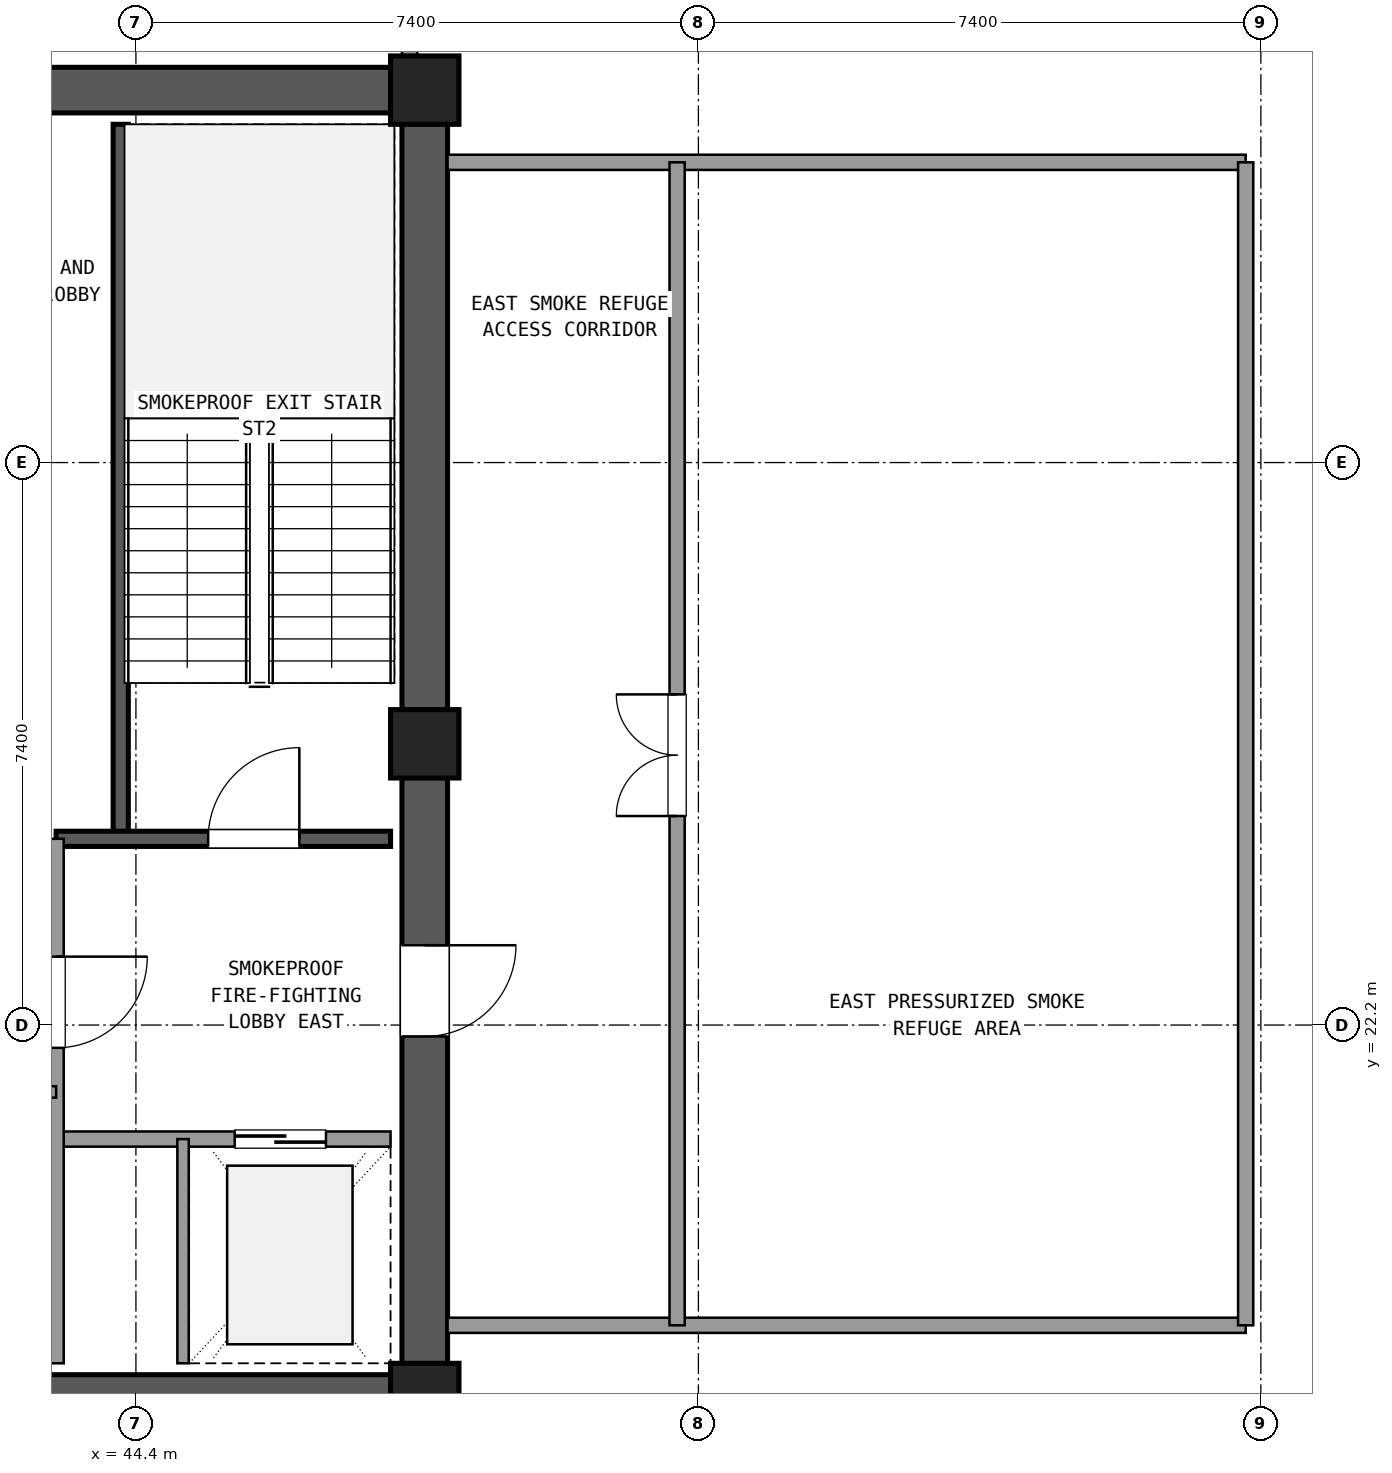
"""IFC4 building model, lengths in metres.
Left out: names, types, materials, properties, quantities, classifications, styles, units other than length and angle.
Written with IfcOpenShell. Run it as: python <this file> out.ifc"""

import sys

from ifc_helpers import new_model, si_unit, direction, frame, frame_2d, origin, origin_2d, place, context, subcontext, project, spatial, rectangle, extrude, element, fill, save


model = new_model("IFC4")
c1 = context("Model", 3, precision=1e-05, world=origin(), true_north=direction((0.0, 1.0)))
c2 = subcontext(c1, "Body", "Model", "MODEL_VIEW")
j1 = project(units=[si_unit("LENGTHUNIT", "METRE"), si_unit("PLANEANGLEUNIT", "RADIAN")], contexts=[c1])
p1 = place(None, origin())
s1 = spatial("IfcSite", under=j1, at=p1, CompositionType="ELEMENT")
p2 = place(p1, origin())
s2 = spatial("IfcBuilding", under=s1, at=p2, CompositionType="ELEMENT")
p3 = place(p2, frame((0.0, 0.0, 232.38)))
s3 = spatial("IfcBuildingStorey", under=s2, at=p3, CompositionType="ELEMENT", Elevation=232.38)
for number, where, z_axis, x_axis in (
    (1, (48.2, 17.3, 0.0), (0.0, 0.0, 1.0), (1.0, 0.0, 0.0)),
    (2, (48.2, 25.9, 0.0), (0.0, 0.0, 1.0), (1.0, 0.0, 0.0)),
    (3, (48.2, 34.5, 0.0), (0.0, 0.0, 1.0), (1.0, 0.0, 0.0)),
):
    element("IfcColumn", number, at=place(p3, frame(where, z_axis=z_axis, x_axis=x_axis)), inside=s3, PredefinedType="COLUMN", context=c2, shape_type="SweptSolid", body=[
        extrude(rectangle(XDim=0.9, YDim=0.9, at=origin_2d()), origin(), (0.0, 0.0, 1.0), 4.68),
    ])
p4 = place(p3, frame((37.445, 17.3, 0.0), z_axis=(0.0, 0.0, 1.0), x_axis=(1.0, 0.0, 0.0)))
e4 = element("IfcWall", 4, at=p4, inside=s3, PredefinedType="SHEAR", context=c2, shape_type="SweptSolid", body=[
    extrude(rectangle(XDim=10.31, YDim=0.6, at=frame_2d((5.155, 0.0))), origin(), (0.0, 0.0, 1.0), 4.38),
])
p5 = place(p3, frame((48.2, 17.745, 0.0), z_axis=(0.0, 0.0, 1.0), x_axis=(0.0, 1.0, 0.0)))
e5 = element("IfcWall", 5, at=p5, inside=s3, PredefinedType="SHEAR", context=c2, shape_type="SweptSolid", body=[
    extrude(rectangle(XDim=7.71, YDim=0.6, at=frame_2d((3.855, 0.0))), origin(), (0.0, 0.0, 1.0), 4.38),
])
p6 = place(p5, frame((4.305, 0.0, 0.0)))
e6 = element("IfcOpeningElement", 6, at=p6, cuts=e5, PredefinedType="OPENING", context=c2, shape_type="SweptSolid", body=[
    extrude(rectangle(XDim=1.2, YDim=2.15, at=frame_2d((0.6, 1.075))), frame((0.0, 0.31, 0.0), z_axis=(0.0, -1.0, 0.0), x_axis=(1.0, 0.0, 0.0)), (0.0, 0.0, 1.0), 0.62),
])
p7 = place(p3, frame((48.2, 26.345, 0.0), z_axis=(0.0, 0.0, 1.0), x_axis=(0.0, 1.0, 0.0)))
e7 = element("IfcWall", 7, at=p7, inside=s3, PredefinedType="SHEAR", context=c2, shape_type="SweptSolid", body=[
    extrude(rectangle(XDim=7.71, YDim=0.6, at=frame_2d((3.855, 0.0))), origin(), (0.0, 0.0, 1.0), 4.38),
])
p8 = place(p3, frame((47.755, 34.5, 0.0), z_axis=(0.0, 0.0, 1.0), x_axis=(-1.0, 0.0, 0.0)))
e8 = element("IfcWall", 8, at=p8, inside=s3, PredefinedType="SHEAR", context=c2, shape_type="SweptSolid", body=[
    extrude(rectangle(XDim=10.31, YDim=0.6, at=frame_2d((5.155, 0.0))), origin(), (0.0, 0.0, 1.0), 4.38),
])
p9 = place(p8, frame((4.655, 0.0, 0.0)))
e9 = element("IfcOpeningElement", 9, at=p9, cuts=e8, PredefinedType="OPENING", context=c2, shape_type="SweptSolid", body=[
    extrude(rectangle(XDim=1.6, YDim=2.2, at=frame_2d((0.8, 1.1))), frame((0.0, 0.31, 0.0), z_axis=(0.0, -1.0, 0.0), x_axis=(1.0, 0.0, 0.0)), (0.0, 0.0, 1.0), 0.62),
])
p10 = place(p3, frame((44.2, 24.65, 0.0), z_axis=(0.0, 0.0, 1.0), x_axis=(0.0, 1.0, 0.0)))
e10 = element("IfcWall", 10, at=p10, inside=s3, PredefinedType="SHEAR", context=c2, shape_type="SweptSolid", body=[
    extrude(rectangle(XDim=9.4, YDim=0.2, at=frame_2d((4.7, 0.0))), origin(), (0.0, 0.0, 1.0), 4.38),
])
p11 = place(p3, frame((43.35, 24.65, 0.0), z_axis=(0.0, 0.0, 1.0), x_axis=(1.0, 0.0, 0.0)))
e11 = element("IfcWall", 11, at=p11, inside=s3, PredefinedType="SHEAR", context=c2, shape_type="SweptSolid", body=[
    extrude(rectangle(XDim=4.4, YDim=0.2, at=frame_2d((2.2, 0.0))), origin(), (0.0, 0.0, 1.0), 4.38),
])
p12 = place(p11, frame((2.0, 0.0, 0.0)))
e12 = element("IfcOpeningElement", 12, at=p12, cuts=e11, PredefinedType="OPENING", context=c2, shape_type="SweptSolid", body=[
    extrude(rectangle(XDim=1.2, YDim=2.15, at=frame_2d((0.6, 1.075))), frame((0.0, 0.11, 0.0), z_axis=(0.0, -1.0, 0.0), x_axis=(1.0, 0.0, 0.0)), (0.0, 0.0, 1.0), 0.22),
])
p13 = place(p3, frame((43.35, 20.7, 0.0), z_axis=(0.0, 0.0, 1.0), x_axis=(1.0, 0.0, 0.0)))
e13 = element("IfcWall", 13, at=p13, inside=s3, PredefinedType="SOLIDWALL", context=c2, shape_type="SweptSolid", body=[
    extrude(rectangle(XDim=4.4, YDim=0.2, at=frame_2d((2.2, 0.0))), origin(), (0.0, 0.0, 1.0), 2.75),
])
p14 = place(p13, frame((2.35, 0.0, 0.0)))
e14 = element("IfcOpeningElement", 14, at=p14, cuts=e13, PredefinedType="OPENING", context=c2, shape_type="SweptSolid", body=[
    extrude(rectangle(XDim=1.2, YDim=2.15, at=frame_2d((0.6, 1.075))), frame((0.0, 0.11, 0.0), z_axis=(0.0, -1.0, 0.0), x_axis=(1.0, 0.0, 0.0)), (0.0, 0.0, 1.0), 0.22),
])
p15 = place(p3, frame((43.35, 17.75, 0.0), z_axis=(0.0, 0.0, 1.0), x_axis=(0.0, 1.0, 0.0)))
e15 = element("IfcWall", 15, at=p15, inside=s3, PredefinedType="SOLIDWALL", context=c2, shape_type="SweptSolid", body=[
    extrude(rectangle(XDim=6.9, YDim=0.2, at=frame_2d((3.45, 0.0))), origin(), (0.0, 0.0, 1.0), 2.75),
])
p16 = place(p15, frame((4.15, 0.0, 0.0)))
e16 = element("IfcOpeningElement", 16, at=p16, cuts=e15, PredefinedType="OPENING", context=c2, shape_type="SweptSolid", body=[
    extrude(rectangle(XDim=1.2, YDim=2.15, at=frame_2d((0.6, 1.075))), frame((0.0, 0.11, 0.0), z_axis=(0.0, -1.0, 0.0), x_axis=(1.0, 0.0, 0.0)), (0.0, 0.0, 1.0), 0.22),
])
p17 = place(p3, frame((45.02, 17.75, 0.0), z_axis=(0.0, 0.0, 1.0), x_axis=(0.0, 1.0, 0.0)))
e17 = element("IfcWall", 17, at=p17, inside=s3, PredefinedType="PARTITIONING", context=c2, shape_type="SweptSolid", body=[
    extrude(rectangle(XDim=2.95, YDim=0.15, at=frame_2d((1.475, 0.0))), origin(), (0.0, 0.0, 1.0), 2.75),
])
p18 = place(p3, frame((37.25, 21.32, 0.0), z_axis=(0.0, 0.0, 1.0), x_axis=(1.0, 0.0, 0.0)))
e18 = element("IfcWall", 18, at=p18, inside=s3, PredefinedType="PARTITIONING", context=c2, shape_type="SweptSolid", body=[
    extrude(rectangle(XDim=6.1, YDim=0.15, at=frame_2d((3.05, 0.0))), origin(), (0.0, 0.0, 1.0), 2.75),
])
p19 = place(p18, frame((0.55, 0.0, 0.0)))
e19 = element("IfcOpeningElement", 19, at=p19, cuts=e18, PredefinedType="OPENING", context=c2, shape_type="SweptSolid", body=[
    extrude(rectangle(XDim=1.0, YDim=2.15, at=frame_2d((0.5, 1.075))), frame((0.0, 0.085, 0.0), z_axis=(0.0, -1.0, 0.0), x_axis=(1.0, 0.0, 0.0)), (0.0, 0.0, 1.0), 0.17),
])
p20 = place(p18, frame((3.5, 0.0, 0.0)))
e20 = element("IfcOpeningElement", 20, at=p20, cuts=e18, PredefinedType="OPENING", context=c2, shape_type="SweptSolid", body=[
    extrude(rectangle(XDim=1.0, YDim=2.15, at=frame_2d((0.5, 1.075))), frame((0.0, 0.085, 0.0), z_axis=(0.0, -1.0, 0.0), x_axis=(1.0, 0.0, 0.0)), (0.0, 0.0, 1.0), 0.17),
])
p21 = place(p3, frame((48.0, 34.8, 0.0), z_axis=(0.0, 0.0, 1.0), x_axis=(0.0, 1.0, 0.0)))
e21 = element("IfcWall", 21, at=p21, inside=s3, PredefinedType="SOLIDWALL", context=c2, shape_type="SweptSolid", body=[
    extrude(rectangle(XDim=10.4, YDim=0.2, at=frame_2d((5.2, 0.0))), origin(), (0.0, 0.0, 1.0), 2.75),
])
for number, where, z_axis, x_axis in (
    (22, (48.5, 18.25, 0.0), (0.0, 0.0, 1.0), (1.0, 0.0, 0.0)),
    (23, (48.5, 33.55, 0.0), (0.0, 0.0, 1.0), (1.0, 0.0, 0.0)),
):
    element("IfcWall", number, at=place(p3, frame(where, z_axis=z_axis, x_axis=x_axis)), inside=s3, PredefinedType="SOLIDWALL", context=c2, shape_type="SweptSolid", body=[
        extrude(rectangle(XDim=10.5, YDim=0.2, at=frame_2d((5.25, 0.0))), origin(), (0.0, 0.0, 1.0), 2.75),
    ])
p22 = place(p3, frame((59.0, 18.25, 0.0), z_axis=(0.0, 0.0, 1.0), x_axis=(0.0, 1.0, 0.0)))
e24 = element("IfcWall", 24, at=p22, inside=s3, PredefinedType="SOLIDWALL", context=c2, shape_type="SweptSolid", body=[
    extrude(rectangle(XDim=15.3, YDim=0.2, at=frame_2d((7.65, 0.0))), origin(), (0.0, 0.0, 1.0), 2.75),
])
p23 = place(p3, frame((51.52, 18.25, 0.0), z_axis=(0.0, 0.0, 1.0), x_axis=(0.0, 1.0, 0.0)))
e25 = element("IfcWall", 25, at=p23, inside=s3, PredefinedType="SOLIDWALL", context=c2, shape_type="SweptSolid", body=[
    extrude(rectangle(XDim=15.3, YDim=0.2, at=frame_2d((7.65, 0.0))), origin(), (0.0, 0.0, 1.0), 2.75),
])
p24 = place(p23, frame((6.7, 0.0, 0.0)))
e26 = element("IfcOpeningElement", 26, at=p24, cuts=e25, PredefinedType="OPENING", context=c2, shape_type="SweptSolid", body=[
    extrude(rectangle(XDim=1.6, YDim=2.2, at=frame_2d((0.8, 1.1))), frame((0.0, 0.11, 0.0), z_axis=(0.0, -1.0, 0.0), x_axis=(1.0, 0.0, 0.0)), (0.0, 0.0, 1.0), 0.22),
])
p25 = place(p12, origin())
e27 = element("IfcDoor", 27, at=p25, inside=s3, OperationType="SINGLE_SWING_RIGHT", PredefinedType="DOOR", context=c2, shape_type="SweptSolid", body=[
    extrude(rectangle(XDim=1.2, YDim=2.15, at=frame_2d((0.6, 1.075))), frame((0.0, 0.025, 0.0), z_axis=(0.0, -1.0, 0.0), x_axis=(1.0, 0.0, 0.0)), (0.0, 0.0, 1.0), 0.05),
])
fill(e12, e27)
p26 = place(p14, origin())
e28 = element("IfcDoor", 28, at=p26, inside=s3, OperationType="SLIDING_TO_RIGHT", PredefinedType="DOOR", context=c2, shape_type="SweptSolid", body=[
    extrude(rectangle(XDim=1.2, YDim=2.15, at=frame_2d((0.6, 1.075))), frame((0.0, 0.025, 0.0), z_axis=(0.0, -1.0, 0.0), x_axis=(1.0, 0.0, 0.0)), (0.0, 0.0, 1.0), 0.05),
])
fill(e14, e28)
p27 = place(p16, frame((1.2, 0.0, 0.0), z_axis=(0.0, 0.0, 1.0), x_axis=(-1.0, 0.0, 0.0)))
e29 = element("IfcDoor", 29, at=p27, inside=s3, OperationType="SINGLE_SWING_RIGHT", PredefinedType="DOOR", context=c2, shape_type="SweptSolid", body=[
    extrude(rectangle(XDim=1.2, YDim=2.15, at=frame_2d((0.6, 1.075))), frame((0.0, 0.025, 0.0), z_axis=(0.0, -1.0, 0.0), x_axis=(1.0, 0.0, 0.0)), (0.0, 0.0, 1.0), 0.05),
])
fill(e16, e29)
p28 = place(p6, frame((1.2, 0.0, 0.0), z_axis=(0.0, 0.0, 1.0), x_axis=(-1.0, 0.0, 0.0)))
e30 = element("IfcDoor", 30, at=p28, inside=s3, OperationType="SINGLE_SWING_RIGHT", PredefinedType="DOOR", context=c2, shape_type="SweptSolid", body=[
    extrude(rectangle(XDim=1.2, YDim=2.15, at=frame_2d((0.6, 1.075))), frame((0.0, 0.025, 0.0), z_axis=(0.0, -1.0, 0.0), x_axis=(1.0, 0.0, 0.0)), (0.0, 0.0, 1.0), 0.05),
])
fill(e6, e30)
p29 = place(p24, origin())
e31 = element("IfcDoor", 31, at=p29, inside=s3, OperationType="DOUBLE_DOOR_SINGLE_SWING", PredefinedType="DOOR", context=c2, shape_type="SweptSolid", body=[
    extrude(rectangle(XDim=1.6, YDim=2.2, at=frame_2d((0.8, 1.1))), frame((0.0, 0.025, 0.0), z_axis=(0.0, -1.0, 0.0), x_axis=(1.0, 0.0, 0.0)), (0.0, 0.0, 1.0), 0.05),
])
fill(e26, e31)
save(model, sys.argv[1])
